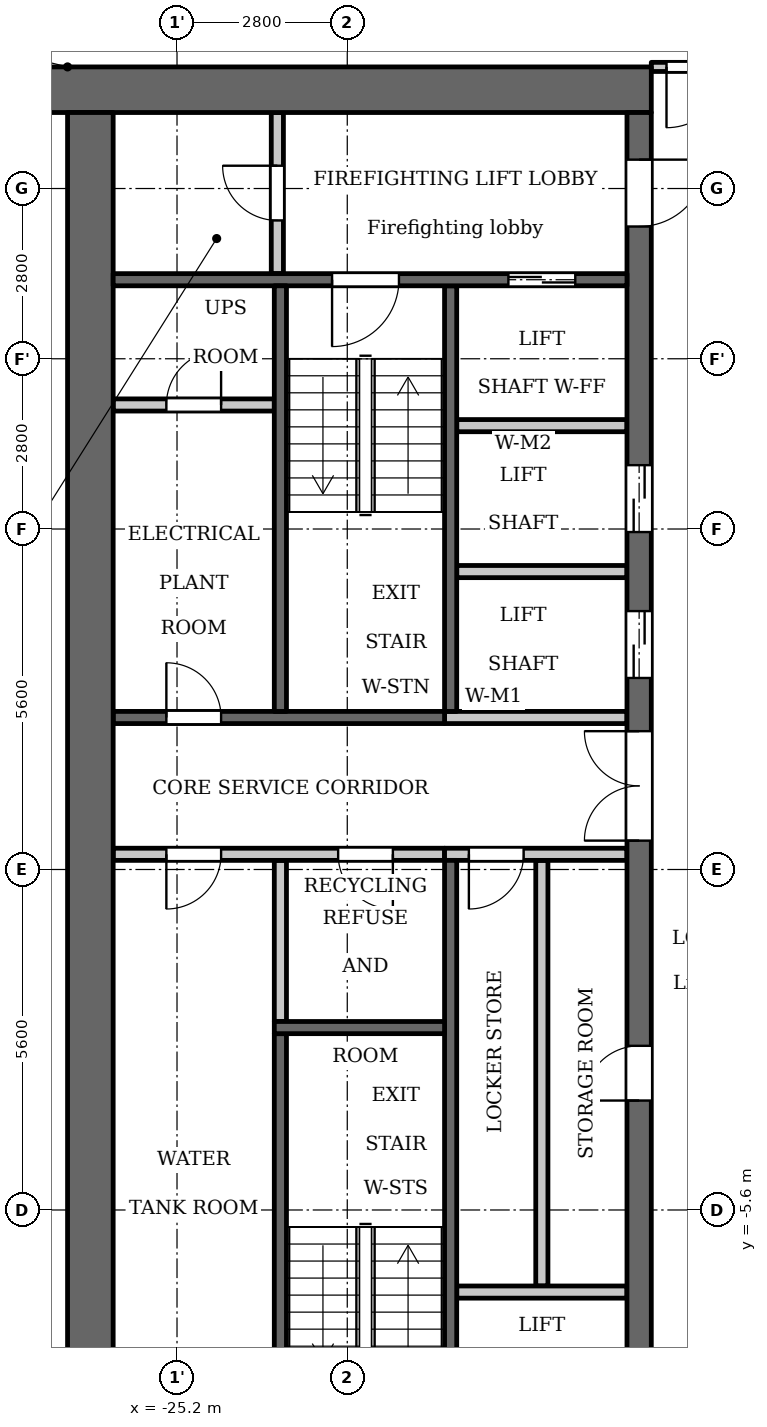
"""IFC4 building model, lengths in metres.
Left out: names, types, materials, properties, quantities, classifications, styles, units other than length and angle.
Written with IfcOpenShell. Run it as: python <this file> out.ifc"""

import sys

from ifc_helpers import new_model, si_unit, direction, frame, frame_2d, origin, place, context, subcontext, project, spatial, rectangle, extrude, element, fill, save


model = new_model("IFC4")
c1 = context("Model", 3, precision=1e-05, world=origin(), true_north=direction((0.0, 1.0)))
c2 = subcontext(c1, "Body", "Model", "MODEL_VIEW")
j1 = project(units=[si_unit("LENGTHUNIT", "METRE"), si_unit("PLANEANGLEUNIT", "RADIAN")], contexts=[c1])
p1 = place(None, origin())
s1 = spatial("IfcSite", under=j1, at=p1, CompositionType="ELEMENT")
p2 = place(p1, origin())
s2 = spatial("IfcBuilding", under=s1, at=p2, CompositionType="ELEMENT")
p3 = place(p2, frame((0.0, 0.0, 136.1)))
s3 = spatial("IfcBuildingStorey", under=s2, at=p3, CompositionType="ELEMENT", Elevation=136.1)
p4 = place(p3, frame((-23.5, -2.5, 0.0), z_axis=(0.0, 0.0, 1.0), x_axis=(0.0, 1.0, 0.0)))
e1 = element("IfcWall", 1, at=p4, inside=s3, PredefinedType="PARTITIONING", context=c2, shape_type="SweptSolid", body=[
    extrude(rectangle(XDim=2.65, YDim=0.2, at=frame_2d((1.325, 0.0))), origin(), (0.0, 0.0, 1.0), 3.2),
])
p5 = place(p3, frame((-20.7, 2.6, 0.0), z_axis=(0.0, 0.0, 1.0), x_axis=(0.0, 1.0, 0.0)))
e2 = element("IfcWall", 2, at=p5, inside=s3, PredefinedType="SHEAR", context=c2, shape_type="SweptSolid", body=[
    extrude(rectangle(XDim=7.0, YDim=0.2, at=frame_2d((3.5, 0.0))), origin(), (0.0, 0.0, 1.0), 3.2),
])
p6 = place(p3, frame((-20.7, -9.6, 0.0), z_axis=(0.0, 0.0, 1.0), x_axis=(0.0, 1.0, 0.0)))
e3 = element("IfcWall", 3, at=p6, inside=s3, PredefinedType="SHEAR", context=c2, shape_type="SweptSolid", body=[
    extrude(rectangle(XDim=9.75, YDim=0.2, at=frame_2d((4.875, 0.0))), origin(), (0.0, 0.0, 1.0), 3.2),
])
p7 = place(p3, frame((-20.8, 2.5, 0.0), z_axis=(0.0, 0.0, 1.0), x_axis=(-1.0, 0.0, 0.0)))
e4 = element("IfcWall", 4, at=p7, inside=s3, PredefinedType="SHEAR", context=c2, shape_type="SweptSolid", body=[
    extrude(rectangle(XDim=5.45, YDim=0.2, at=frame_2d((2.725, 0.0))), origin(), (0.0, 0.0, 1.0), 3.2),
])
p8 = place(p7, frame((3.675, 0.0, 0.0)))
e5 = element("IfcOpeningElement", 5, at=p8, cuts=e4, PredefinedType="OPENING", context=c2, shape_type="SweptSolid", body=[
    extrude(rectangle(XDim=0.9, YDim=2.1, at=frame_2d((0.45, 1.05))), frame((0.0, 0.11, 0.0), z_axis=(0.0, -1.0, 0.0), x_axis=(1.0, 0.0, 0.0)), (0.0, 0.0, 1.0), 0.22),
])
p9 = place(p3, frame((-20.8, 0.25, 0.0), z_axis=(0.0, 0.0, 1.0), x_axis=(-1.0, 0.0, 0.0)))
e6 = element("IfcWall", 6, at=p9, inside=s3, PredefinedType="PARTITIONING", context=c2, shape_type="SweptSolid", body=[
    extrude(rectangle(XDim=5.45, YDim=0.2, at=frame_2d((2.725, 0.0))), origin(), (0.0, 0.0, 1.0), 3.2),
])
p10 = place(p9, frame((0.85, 0.0, 0.0)))
e7 = element("IfcOpeningElement", 7, at=p10, cuts=e6, PredefinedType="OPENING", context=c2, shape_type="SweptSolid", body=[
    extrude(rectangle(XDim=0.9, YDim=2.1, at=frame_2d((0.45, 1.05))), frame((0.0, 0.11, 0.0), z_axis=(0.0, -1.0, 0.0), x_axis=(1.0, 0.0, 0.0)), (0.0, 0.0, 1.0), 0.22),
])
p11 = place(p9, frame((3.675, 0.0, 0.0)))
e8 = element("IfcOpeningElement", 8, at=p11, cuts=e6, PredefinedType="OPENING", context=c2, shape_type="SweptSolid", body=[
    extrude(rectangle(XDim=0.9, YDim=2.1, at=frame_2d((0.45, 1.05))), frame((0.0, 0.11, 0.0), z_axis=(0.0, -1.0, 0.0), x_axis=(1.0, 0.0, 0.0)), (0.0, 0.0, 1.0), 0.22),
])
p12 = place(p3, frame((-17.4, 12.825, 0.0), z_axis=(0.0, 0.0, 1.0), x_axis=(-1.0, 0.0, 0.0)))
e9 = element("IfcWall", 9, at=p12, inside=s3, PredefinedType="SHEAR", context=c2, shape_type="SweptSolid", body=[
    extrude(rectangle(XDim=10.4, YDim=0.75, at=frame_2d((5.2, 0.0))), origin(), (0.0, 0.0, 1.0), 3.2),
])
p13 = place(p3, frame((-19.2, -6.85, 0.0), z_axis=(0.0, 0.0, 1.0), x_axis=(0.0, 1.0, 0.0)))
e10 = element("IfcWall", 10, at=p13, inside=s3, PredefinedType="PARTITIONING", context=c2, shape_type="SweptSolid", body=[
    extrude(rectangle(XDim=7.0, YDim=0.2, at=frame_2d((3.5, 0.0))), origin(), (0.0, 0.0, 1.0), 3.2),
])
p14 = place(p3, frame((-17.6, -12.45, 0.0), z_axis=(0.0, 0.0, 1.0), x_axis=(0.0, 1.0, 0.0)))
e11 = element("IfcWall", 11, at=p14, inside=s3, PredefinedType="SHEAR", context=c2, shape_type="SweptSolid", body=[
    extrude(rectangle(XDim=24.9, YDim=0.4, at=frame_2d((12.45, 0.0))), origin(), (0.0, 0.0, 1.0), 3.2),
])
p15 = place(p14, frame((8.65, 0.0, 0.0)))
e12 = element("IfcOpeningElement", 12, at=p15, cuts=e11, PredefinedType="OPENING", context=c2, shape_type="SweptSolid", body=[
    extrude(rectangle(XDim=0.9, YDim=2.1, at=frame_2d((0.45, 1.05))), frame((0.0, 0.21, 0.0), z_axis=(0.0, -1.0, 0.0), x_axis=(1.0, 0.0, 0.0)), (0.0, 0.0, 1.0), 0.42),
])
p16 = place(p14, frame((15.6, 0.0, 0.0)))
e13 = element("IfcOpeningElement", 13, at=p16, cuts=e11, PredefinedType="OPENING", context=c2, shape_type="SweptSolid", body=[
    extrude(rectangle(XDim=1.1, YDim=2.1, at=frame_2d((0.55, 1.05))), frame((0.0, 0.21, 0.0), z_axis=(0.0, -1.0, 0.0), x_axis=(1.0, 0.0, 0.0)), (0.0, 0.0, 1.0), 0.42),
])
p17 = place(p14, frame((18.0, 0.0, 0.0)))
e14 = element("IfcOpeningElement", 14, at=p17, cuts=e11, PredefinedType="OPENING", context=c2, shape_type="SweptSolid", body=[
    extrude(rectangle(XDim=1.1, YDim=2.1, at=frame_2d((0.55, 1.05))), frame((0.0, 0.21, 0.0), z_axis=(0.0, -1.0, 0.0), x_axis=(1.0, 0.0, 0.0)), (0.0, 0.0, 1.0), 0.42),
])
p18 = place(p14, frame((23.025, 0.0, 0.0)))
e15 = element("IfcOpeningElement", 15, at=p18, cuts=e11, PredefinedType="OPENING", context=c2, shape_type="SweptSolid", body=[
    extrude(rectangle(XDim=1.1, YDim=2.1, at=frame_2d((0.55, 1.05))), frame((0.0, 0.21, 0.0), z_axis=(0.0, -1.0, 0.0), x_axis=(1.0, 0.0, 0.0)), (0.0, 0.0, 1.0), 0.42),
])
p19 = place(p14, frame((0.775, 0.0, 0.0)))
e16 = element("IfcOpeningElement", 16, at=p19, cuts=e11, PredefinedType="OPENING", context=c2, shape_type="SweptSolid", body=[
    extrude(rectangle(XDim=1.1, YDim=2.1, at=frame_2d((0.55, 1.05))), frame((0.0, 0.21, 0.0), z_axis=(0.0, -1.0, 0.0), x_axis=(1.0, 0.0, 0.0)), (0.0, 0.0, 1.0), 0.42),
])
p20 = place(p14, frame((12.925, 0.0, 0.0)))
e17 = element("IfcOpeningElement", 17, at=p20, cuts=e11, PredefinedType="OPENING", context=c2, shape_type="SweptSolid", body=[
    extrude(rectangle(XDim=1.8, YDim=2.1, at=frame_2d((0.9, 1.05))), frame((0.0, 0.21, 0.0), z_axis=(0.0, -1.0, 0.0), x_axis=(1.0, 0.0, 0.0)), (0.0, 0.0, 1.0), 0.42),
])
p21 = place(p3, frame((-26.625, -12.45, 0.0), z_axis=(0.0, 0.0, 1.0), x_axis=(0.0, 1.0, 0.0)))
e18 = element("IfcWall", 18, at=p21, inside=s3, PredefinedType="SHEAR", context=c2, shape_type="SweptSolid", body=[
    extrude(rectangle(XDim=24.9, YDim=0.75, at=frame_2d((12.45, 0.0))), origin(), (0.0, 0.0, 1.0), 3.2),
])
p22 = place(p3, frame((-23.55, 9.8, 0.0), z_axis=(0.0, 0.0, 1.0), x_axis=(0.0, 1.0, 0.0)))
e19 = element("IfcWall", 19, at=p22, inside=s3, PredefinedType="PARTITIONING", context=c2, shape_type="SweptSolid", body=[
    extrude(rectangle(XDim=2.65, YDim=0.2, at=frame_2d((1.325, 0.0))), origin(), (0.0, 0.0, 1.0), 3.2),
])
p23 = place(p22, frame((0.875, 0.0, 0.0)))
e20 = element("IfcOpeningElement", 20, at=p23, cuts=e19, PredefinedType="OPENING", context=c2, shape_type="SweptSolid", body=[
    extrude(rectangle(XDim=0.9, YDim=2.1, at=frame_2d((0.45, 1.05))), frame((0.0, 0.11, 0.0), z_axis=(0.0, -1.0, 0.0), x_axis=(1.0, 0.0, 0.0)), (0.0, 0.0, 1.0), 0.22),
])
p24 = place(p3, frame((-23.6, 7.64, 0.0), z_axis=(0.0, 0.0, 1.0), x_axis=(-1.0, 0.0, 0.0)))
e21 = element("IfcWall", 21, at=p24, inside=s3, PredefinedType="PARTITIONING", context=c2, shape_type="SweptSolid", body=[
    extrude(rectangle(XDim=2.65, YDim=0.2, at=frame_2d((1.325, 0.0))), origin(), (0.0, 0.0, 1.0), 3.2),
])
p25 = place(p24, frame((0.875, 0.0, 0.0)))
e22 = element("IfcOpeningElement", 22, at=p25, cuts=e21, PredefinedType="OPENING", context=c2, shape_type="SweptSolid", body=[
    extrude(rectangle(XDim=0.9, YDim=2.1, at=frame_2d((0.45, 1.05))), frame((0.0, 0.11, 0.0), z_axis=(0.0, -1.0, 0.0), x_axis=(1.0, 0.0, 0.0)), (0.0, 0.0, 1.0), 0.22),
])
p26 = place(p3, frame((-17.8, -6.95, 0.0), z_axis=(0.0, 0.0, 1.0), x_axis=(-1.0, 0.0, 0.0)))
e23 = element("IfcWall", 23, at=p26, inside=s3, PredefinedType="PARTITIONING", context=c2, shape_type="SweptSolid", body=[
    extrude(rectangle(XDim=2.8, YDim=0.2, at=frame_2d((1.4, 0.0))), origin(), (0.0, 0.0, 1.0), 3.2),
])
p27 = place(p3, frame((-17.8, 0.25, 0.0), z_axis=(0.0, 0.0, 1.0), x_axis=(-1.0, 0.0, 0.0)))
e24 = element("IfcWall", 24, at=p27, inside=s3, PredefinedType="PARTITIONING", context=c2, shape_type="SweptSolid", body=[
    extrude(rectangle(XDim=3.0, YDim=0.2, at=frame_2d((1.5, 0.0))), origin(), (0.0, 0.0, 1.0), 3.2),
])
p28 = place(p27, frame((1.7, 0.0, 0.0)))
e25 = element("IfcOpeningElement", 25, at=p28, cuts=e24, PredefinedType="OPENING", context=c2, shape_type="SweptSolid", body=[
    extrude(rectangle(XDim=0.9, YDim=2.1, at=frame_2d((0.45, 1.05))), frame((0.0, 0.11, 0.0), z_axis=(0.0, -1.0, 0.0), x_axis=(1.0, 0.0, 0.0)), (0.0, 0.0, 1.0), 0.22),
])
p29 = place(p3, frame((-17.8, 2.5, 0.0), z_axis=(0.0, 0.0, 1.0), x_axis=(-1.0, 0.0, 0.0)))
e26 = element("IfcWall", 26, at=p29, inside=s3, PredefinedType="PARTITIONING", context=c2, shape_type="SweptSolid", body=[
    extrude(rectangle(XDim=3.0, YDim=0.2, at=frame_2d((1.5, 0.0))), origin(), (0.0, 0.0, 1.0), 3.2),
])
for number, where, z_axis, x_axis in (
    (27, (-17.8, 4.9, 0.0), (0.0, 0.0, 1.0), (-1.0, 0.0, 0.0)),
    (28, (-17.8, 7.3, 0.0), (0.0, 0.0, 1.0), (-1.0, 0.0, 0.0)),
):
    element("IfcWall", number, at=place(p3, frame(where, z_axis=z_axis, x_axis=x_axis)), inside=s3, PredefinedType="PARTITIONING", context=c2, shape_type="SweptSolid", body=[
        extrude(rectangle(XDim=2.8, YDim=0.2, at=frame_2d((1.4, 0.0))), origin(), (0.0, 0.0, 1.0), 3.2),
    ])
p30 = place(p3, frame((-17.8, 9.7, 0.0), z_axis=(0.0, 0.0, 1.0), x_axis=(-1.0, 0.0, 0.0)))
e29 = element("IfcWall", 29, at=p30, inside=s3, PredefinedType="SHEAR", context=c2, shape_type="SweptSolid", body=[
    extrude(rectangle(XDim=8.45, YDim=0.2, at=frame_2d((4.225, 0.0))), origin(), (0.0, 0.0, 1.0), 3.2),
])
p31 = place(p30, frame((0.85, 0.0, 0.0)))
e30 = element("IfcOpeningElement", 30, at=p31, cuts=e29, PredefinedType="OPENING", context=c2, shape_type="SweptSolid", body=[
    extrude(rectangle(XDim=1.1, YDim=2.1, at=frame_2d((0.55, 1.05))), frame((0.0, 0.11, 0.0), z_axis=(0.0, -1.0, 0.0), x_axis=(1.0, 0.0, 0.0)), (0.0, 0.0, 1.0), 0.22),
])
p32 = place(p30, frame((3.75, 0.0, 0.0)))
e31 = element("IfcOpeningElement", 31, at=p32, cuts=e29, PredefinedType="OPENING", context=c2, shape_type="SweptSolid", body=[
    extrude(rectangle(XDim=1.1, YDim=2.1, at=frame_2d((0.55, 1.05))), frame((0.0, 0.11, 0.0), z_axis=(0.0, -1.0, 0.0), x_axis=(1.0, 0.0, 0.0)), (0.0, 0.0, 1.0), 0.22),
])
p33 = place(p3, frame((-23.5, 2.6, 0.0), z_axis=(0.0, 0.0, 1.0), x_axis=(0.0, 1.0, 0.0)))
e32 = element("IfcWall", 32, at=p33, inside=s3, PredefinedType="SHEAR", context=c2, shape_type="SweptSolid", body=[
    extrude(rectangle(XDim=7.0, YDim=0.2, at=frame_2d((3.5, 0.0))), origin(), (0.0, 0.0, 1.0), 3.2),
])
p34 = place(p3, frame((-23.5, -9.6, 0.0), z_axis=(0.0, 0.0, 1.0), x_axis=(0.0, 1.0, 0.0)))
e33 = element("IfcWall", 33, at=p34, inside=s3, PredefinedType="SHEAR", context=c2, shape_type="SweptSolid", body=[
    extrude(rectangle(XDim=6.9, YDim=0.2, at=frame_2d((3.45, 0.0))), origin(), (0.0, 0.0, 1.0), 3.2),
])
p35 = place(p3, frame((-20.8, -2.6, 0.0), z_axis=(0.0, 0.0, 1.0), x_axis=(-1.0, 0.0, 0.0)))
e34 = element("IfcWall", 34, at=p35, inside=s3, PredefinedType="SHEAR", context=c2, shape_type="SweptSolid", body=[
    extrude(rectangle(XDim=2.8, YDim=0.2, at=frame_2d((1.4, 0.0))), origin(), (0.0, 0.0, 1.0), 3.2),
])
p36 = place(p3, frame((-17.4, 13.2, 0.0), z_axis=(0.0, 0.0, 1.0), x_axis=(1.0, 0.0, 0.0)))
e35 = element("IfcWall", 35, at=p36, inside=s3, PredefinedType="PARTITIONING", context=c2, shape_type="SweptSolid", body=[
    extrude(rectangle(XDim=34.8, YDim=0.15, at=frame_2d((17.4, 0.0))), origin(), (0.0, 0.0, 1.0), 3.2),
])
p37 = place(p36, frame((0.25, 0.0, 0.0)))
e36 = element("IfcOpeningElement", 36, at=p37, cuts=e35, PredefinedType="OPENING", context=c2, shape_type="SweptSolid", body=[
    extrude(rectangle(XDim=1.0, YDim=2.1, at=frame_2d((0.5, 1.05))), frame((0.0, 0.085, 0.0), z_axis=(0.0, -1.0, 0.0), x_axis=(1.0, 0.0, 0.0)), (0.0, 0.0, 1.0), 0.17),
])
p38 = place(p36, frame((33.65, 0.0, 0.0)))
e37 = element("IfcOpeningElement", 37, at=p38, cuts=e35, PredefinedType="OPENING", context=c2, shape_type="SweptSolid", body=[
    extrude(rectangle(XDim=1.0, YDim=2.1, at=frame_2d((0.5, 1.05))), frame((0.0, 0.085, 0.0), z_axis=(0.0, -1.0, 0.0), x_axis=(1.0, 0.0, 0.0)), (0.0, 0.0, 1.0), 0.17),
])
p39 = place(p36, frame((15.75, 0.0, 0.0)))
e38 = element("IfcOpeningElement", 38, at=p39, cuts=e35, PredefinedType="OPENING", context=c2, shape_type="SweptSolid", body=[
    extrude(rectangle(XDim=1.0, YDim=2.1, at=frame_2d((0.5, 1.05))), frame((0.0, 0.085, 0.0), z_axis=(0.0, -1.0, 0.0), x_axis=(1.0, 0.0, 0.0)), (0.0, 0.0, 1.0), 0.17),
])
p40 = place(p36, frame((19.35, 0.0, 0.0)))
e39 = element("IfcOpeningElement", 39, at=p40, cuts=e35, PredefinedType="OPENING", context=c2, shape_type="SweptSolid", body=[
    extrude(rectangle(XDim=1.0, YDim=2.1, at=frame_2d((0.5, 1.05))), frame((0.0, 0.085, 0.0), z_axis=(0.0, -1.0, 0.0), x_axis=(1.0, 0.0, 0.0)), (0.0, 0.0, 1.0), 0.17),
])
p41 = place(p36, frame((26.95, 0.0, 0.0)))
e40 = element("IfcOpeningElement", 40, at=p41, cuts=e35, PredefinedType="OPENING", context=c2, shape_type="SweptSolid", body=[
    extrude(rectangle(XDim=1.0, YDim=2.1, at=frame_2d((0.5, 1.05))), frame((0.0, 0.085, 0.0), z_axis=(0.0, -1.0, 0.0), x_axis=(1.0, 0.0, 0.0)), (0.0, 0.0, 1.0), 0.17),
])
p42 = place(p36, frame((29.75, 0.0, 0.0)))
e41 = element("IfcOpeningElement", 41, at=p42, cuts=e35, PredefinedType="OPENING", context=c2, shape_type="SweptSolid", body=[
    extrude(rectangle(XDim=1.0, YDim=2.1, at=frame_2d((0.5, 1.05))), frame((0.0, 0.085, 0.0), z_axis=(0.0, -1.0, 0.0), x_axis=(1.0, 0.0, 0.0)), (0.0, 0.0, 1.0), 0.17),
])
p43 = place(p15, origin())
e42 = element("IfcDoor", 42, at=p43, inside=s3, OperationType="SINGLE_SWING_RIGHT", PredefinedType="DOOR", context=c2, shape_type="SweptSolid", body=[
    extrude(rectangle(XDim=0.9, YDim=2.1, at=frame_2d((0.45, 1.05))), frame((0.0, 0.025, 0.0), z_axis=(0.0, -1.0, 0.0), x_axis=(1.0, 0.0, 0.0)), (0.0, 0.0, 1.0), 0.05),
])
fill(e12, e42)
p44 = place(p28, origin())
e43 = element("IfcDoor", 43, at=p44, inside=s3, OperationType="SINGLE_SWING_LEFT", PredefinedType="DOOR", context=c2, shape_type="SweptSolid", body=[
    extrude(rectangle(XDim=0.9, YDim=2.1, at=frame_2d((0.45, 1.05))), frame((0.0, 0.025, 0.0), z_axis=(0.0, -1.0, 0.0), x_axis=(1.0, 0.0, 0.0)), (0.0, 0.0, 1.0), 0.05),
])
fill(e25, e43)
p45 = place(p16, origin())
e44 = element("IfcDoor", 44, at=p45, inside=s3, OperationType="DOUBLE_DOOR_SLIDING", PredefinedType="DOOR", context=c2, shape_type="SweptSolid", body=[
    extrude(rectangle(XDim=1.1, YDim=2.1, at=frame_2d((0.55, 1.05))), frame((0.0, 0.025, 0.0), z_axis=(0.0, -1.0, 0.0), x_axis=(1.0, 0.0, 0.0)), (0.0, 0.0, 1.0), 0.05),
])
fill(e13, e44)
p46 = place(p17, origin())
e45 = element("IfcDoor", 45, at=p46, inside=s3, OperationType="DOUBLE_DOOR_SLIDING", PredefinedType="DOOR", context=c2, shape_type="SweptSolid", body=[
    extrude(rectangle(XDim=1.1, YDim=2.1, at=frame_2d((0.55, 1.05))), frame((0.0, 0.025, 0.0), z_axis=(0.0, -1.0, 0.0), x_axis=(1.0, 0.0, 0.0)), (0.0, 0.0, 1.0), 0.05),
])
fill(e14, e45)
p47 = place(p31, origin())
e46 = element("IfcDoor", 46, at=p47, inside=s3, OperationType="DOUBLE_DOOR_SLIDING", PredefinedType="DOOR", context=c2, shape_type="SweptSolid", body=[
    extrude(rectangle(XDim=1.1, YDim=2.1, at=frame_2d((0.55, 1.05))), frame((0.0, 0.025, 0.0), z_axis=(0.0, -1.0, 0.0), x_axis=(1.0, 0.0, 0.0)), (0.0, 0.0, 1.0), 0.05),
])
fill(e30, e46)
p48 = place(p18, origin())
e47 = element("IfcDoor", 47, at=p48, inside=s3, OperationType="SINGLE_SWING_RIGHT", PredefinedType="DOOR", context=c2, shape_type="SweptSolid", body=[
    extrude(rectangle(XDim=1.1, YDim=2.1, at=frame_2d((0.55, 1.05))), frame((0.0, 0.025, 0.0), z_axis=(0.0, -1.0, 0.0), x_axis=(1.0, 0.0, 0.0)), (0.0, 0.0, 1.0), 0.05),
])
fill(e15, e47)
p49 = place(p23, origin())
e48 = element("IfcDoor", 48, at=p49, inside=s3, OperationType="SINGLE_SWING_LEFT", PredefinedType="DOOR", context=c2, shape_type="SweptSolid", body=[
    extrude(rectangle(XDim=0.9, YDim=2.1, at=frame_2d((0.45, 1.05))), frame((0.0, 0.025, 0.0), z_axis=(0.0, -1.0, 0.0), x_axis=(1.0, 0.0, 0.0)), (0.0, 0.0, 1.0), 0.05),
])
fill(e20, e48)
p50 = place(p32, origin())
e49 = element("IfcDoor", 49, at=p50, inside=s3, OperationType="SINGLE_SWING_LEFT", PredefinedType="DOOR", context=c2, shape_type="SweptSolid", body=[
    extrude(rectangle(XDim=1.1, YDim=2.1, at=frame_2d((0.55, 1.05))), frame((0.0, 0.025, 0.0), z_axis=(0.0, -1.0, 0.0), x_axis=(1.0, 0.0, 0.0)), (0.0, 0.0, 1.0), 0.05),
])
fill(e31, e49)
p51 = place(p20, origin())
e50 = element("IfcDoor", 50, at=p51, inside=s3, OperationType="DOUBLE_DOOR_SINGLE_SWING", PredefinedType="DOOR", context=c2, shape_type="SweptSolid", body=[
    extrude(rectangle(XDim=1.8, YDim=2.1, at=frame_2d((0.9, 1.05))), frame((0.0, 0.025, 0.0), z_axis=(0.0, -1.0, 0.0), x_axis=(1.0, 0.0, 0.0)), (0.0, 0.0, 1.0), 0.05),
])
fill(e17, e50)
p52 = place(p10, origin())
e51 = element("IfcDoor", 51, at=p52, inside=s3, OperationType="SINGLE_SWING_RIGHT", PredefinedType="DOOR", context=c2, shape_type="SweptSolid", body=[
    extrude(rectangle(XDim=0.9, YDim=2.1, at=frame_2d((0.45, 1.05))), frame((0.0, 0.025, 0.0), z_axis=(0.0, -1.0, 0.0), x_axis=(1.0, 0.0, 0.0)), (0.0, 0.0, 1.0), 0.05),
])
fill(e7, e51)
p53 = place(p11, origin())
e52 = element("IfcDoor", 52, at=p53, inside=s3, OperationType="SINGLE_SWING_LEFT", PredefinedType="DOOR", context=c2, shape_type="SweptSolid", body=[
    extrude(rectangle(XDim=0.9, YDim=2.1, at=frame_2d((0.45, 1.05))), frame((0.0, 0.025, 0.0), z_axis=(0.0, -1.0, 0.0), x_axis=(1.0, 0.0, 0.0)), (0.0, 0.0, 1.0), 0.05),
])
fill(e8, e52)
p54 = place(p25, origin())
e53 = element("IfcDoor", 53, at=p54, inside=s3, OperationType="SINGLE_SWING_LEFT", PredefinedType="DOOR", context=c2, shape_type="SweptSolid", body=[
    extrude(rectangle(XDim=0.9, YDim=2.1, at=frame_2d((0.45, 1.05))), frame((0.0, 0.025, 0.0), z_axis=(0.0, -1.0, 0.0), x_axis=(1.0, 0.0, 0.0)), (0.0, 0.0, 1.0), 0.05),
])
fill(e22, e53)
p55 = place(p8, origin())
e54 = element("IfcDoor", 54, at=p55, inside=s3, OperationType="SINGLE_SWING_RIGHT", PredefinedType="DOOR", context=c2, shape_type="SweptSolid", body=[
    extrude(rectangle(XDim=0.9, YDim=2.1, at=frame_2d((0.45, 1.05))), frame((0.0, 0.025, 0.0), z_axis=(0.0, -1.0, 0.0), x_axis=(1.0, 0.0, 0.0)), (0.0, 0.0, 1.0), 0.05),
])
fill(e5, e54)
p56 = place(p37, origin())
e55 = element("IfcDoor", 55, at=p56, inside=s3, OperationType="SINGLE_SWING_LEFT", PredefinedType="DOOR", context=c2, shape_type="SweptSolid", body=[
    extrude(rectangle(XDim=1.0, YDim=2.1, at=frame_2d((0.5, 1.05))), frame((0.0, 0.025, 0.0), z_axis=(0.0, -1.0, 0.0), x_axis=(1.0, 0.0, 0.0)), (0.0, 0.0, 1.0), 0.05),
])
fill(e36, e55)
save(model, sys.argv[1])
